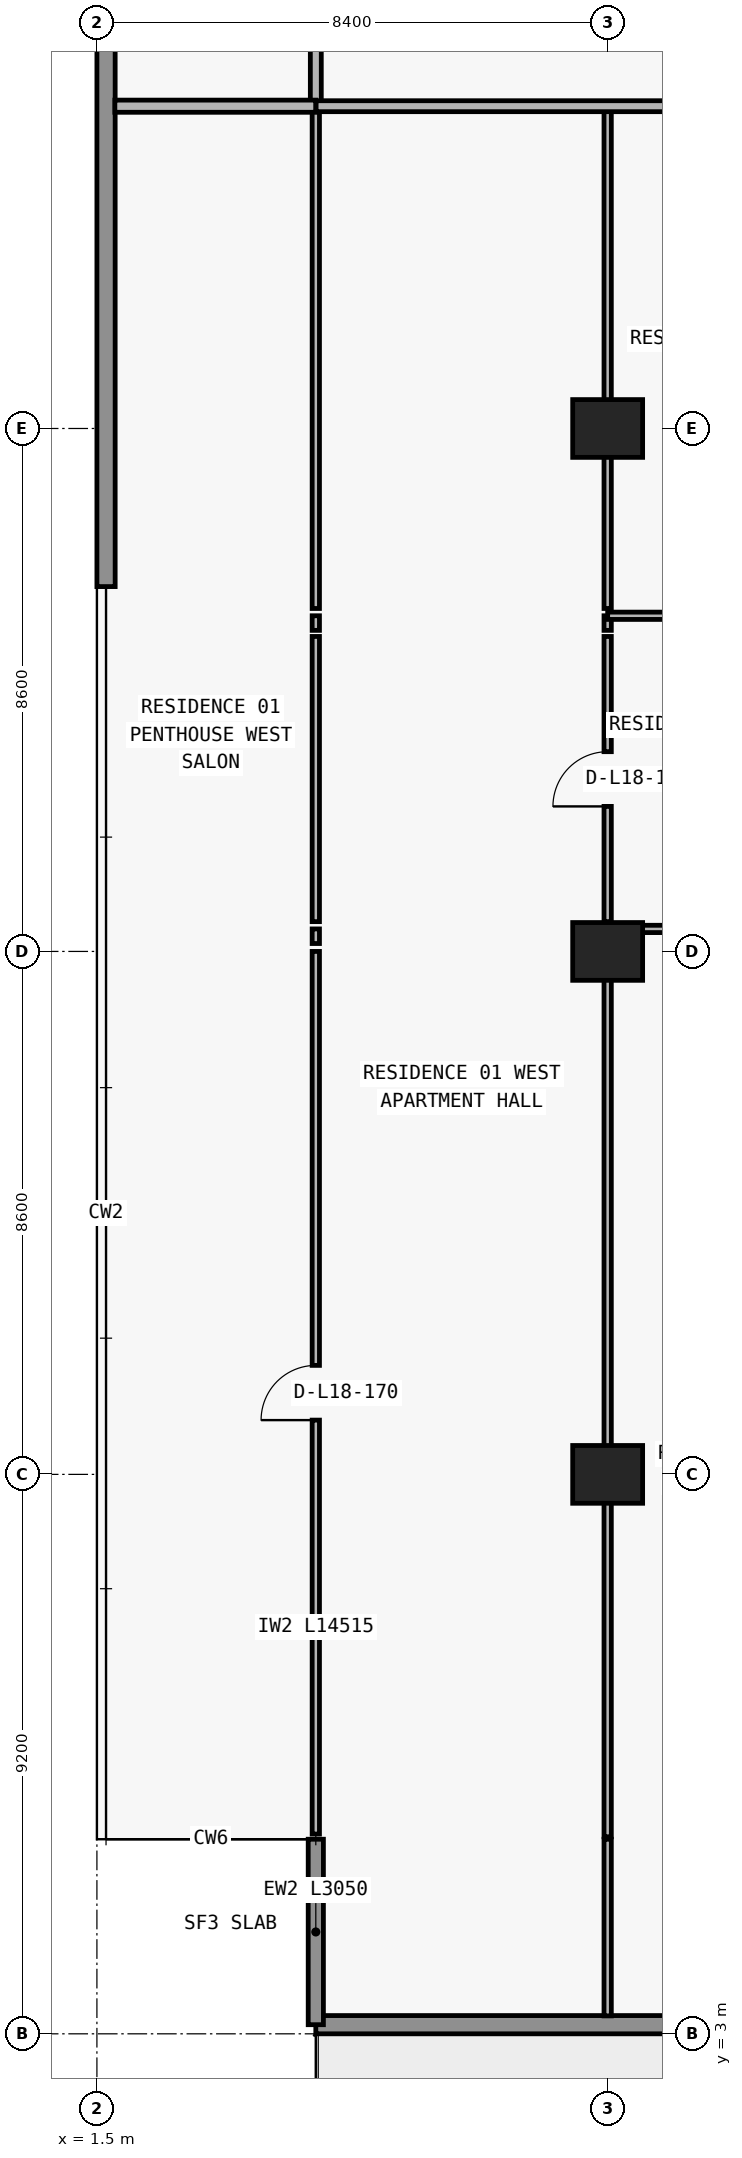
"""IFC4 building model, lengths in metres.
Left out: names, types, materials, properties, quantities, classifications, styles, units other than length and angle.
Written with IfcOpenShell. Run it as: python <this file> out.ifc"""

import sys

from ifc_helpers import new_model, si_unit, direction, frame, frame_2d, origin, origin_2d, place, context, subcontext, project, spatial, rectangle, extrude, element, fill, save


model = new_model("IFC4")
c1 = context("Model", 3, precision=1e-05, world=origin(), true_north=direction((0.0, 1.0)))
c2 = subcontext(c1, "Body", "Model", "MODEL_VIEW")
j1 = project(units=[si_unit("LENGTHUNIT", "METRE"), si_unit("PLANEANGLEUNIT", "RADIAN")], contexts=[c1])
p1 = place(None, origin())
s1 = spatial("IfcSite", under=j1, at=p1, CompositionType="ELEMENT")
p2 = place(p1, origin())
s2 = spatial("IfcBuilding", under=s1, at=p2, CompositionType="ELEMENT")
p3 = place(p2, frame((0.0, 0.0, 69.6)))
s3 = spatial("IfcBuildingStorey", under=s2, at=p3, CompositionType="ELEMENT", Elevation=69.6)
for number, where, z_axis, x_axis in (
    (1, (9.9, 12.2, 0.0), (0.0, 0.0, 1.0), (1.0, 0.0, 0.0)),
    (2, (9.9, 20.8, 0.0), (0.0, 0.0, 1.0), (1.0, 0.0, 0.0)),
    (3, (9.9, 29.4, 0.0), (0.0, 0.0, 1.0), (1.0, 0.0, 0.0)),
):
    element("IfcColumn", number, at=place(p3, frame(where, z_axis=z_axis, x_axis=x_axis)), inside=s3, PredefinedType="COLUMN", context=c2, shape_type="SweptSolid", body=[
        extrude(rectangle(XDim=1.15, YDim=0.95, at=origin_2d()), origin(), (0.0, 0.0, 1.0), 3.05),
    ])
p4 = place(p3, frame((72.7, 3.15, 0.0), z_axis=(0.0, 0.0, 1.0), x_axis=(-1.0, 0.0, 0.0)))
e4 = element("IfcWall", 4, at=p4, inside=s3, PredefinedType="STANDARD", context=c2, shape_type="SweptSolid", body=[
    extrude(rectangle(XDim=67.6, YDim=0.3, at=frame_2d((33.8, 0.0))), origin(), (0.0, 0.0, 1.0), 3.05),
])
p5 = place(p4, frame((59.826, 0.0, 0.0)))
e5 = element("IfcOpeningElement", 5, at=p5, cuts=e4, PredefinedType="OPENING", context=c2, shape_type="SweptSolid", body=[
    extrude(rectangle(XDim=2.0, YDim=2.3, at=frame_2d((1.0, 1.15))), frame((0.0, 0.16, 0.0), z_axis=(0.0, -1.0, 0.0), x_axis=(1.0, 0.0, 0.0)), (0.0, 0.0, 1.0), 0.32),
])
p6 = place(p4, frame((55.526, 0.0, 0.85)))
e6 = element("IfcOpeningElement", 6, at=p6, cuts=e4, PredefinedType="OPENING", context=c2, shape_type="SweptSolid", body=[
    extrude(rectangle(XDim=2.2, YDim=1.55, at=frame_2d((1.1, 0.775))), frame((0.0, 0.16, 0.0), z_axis=(0.0, -1.0, 0.0), x_axis=(1.0, 0.0, 0.0)), (0.0, 0.0, 1.0), 0.32),
])
p7 = place(p4, frame((51.09, 0.0, 0.0)))
e7 = element("IfcOpeningElement", 7, at=p7, cuts=e4, PredefinedType="OPENING", context=c2, shape_type="SweptSolid", body=[
    extrude(rectangle(XDim=2.0, YDim=2.3, at=frame_2d((1.0, 1.15))), frame((0.0, 0.16, 0.0), z_axis=(0.0, -1.0, 0.0), x_axis=(1.0, 0.0, 0.0)), (0.0, 0.0, 1.0), 0.32),
])
p8 = place(p4, frame((46.99, 0.0, 0.85)))
e8 = element("IfcOpeningElement", 8, at=p8, cuts=e4, PredefinedType="OPENING", context=c2, shape_type="SweptSolid", body=[
    extrude(rectangle(XDim=1.8, YDim=1.55, at=frame_2d((0.9, 0.775))), frame((0.0, 0.16, 0.0), z_axis=(0.0, -1.0, 0.0), x_axis=(1.0, 0.0, 0.0)), (0.0, 0.0, 1.0), 0.32),
])
p9 = place(p4, frame((43.026, 0.0, 0.0)))
e9 = element("IfcOpeningElement", 9, at=p9, cuts=e4, PredefinedType="OPENING", context=c2, shape_type="SweptSolid", body=[
    extrude(rectangle(XDim=2.0, YDim=2.3, at=frame_2d((1.0, 1.15))), frame((0.0, 0.16, 0.0), z_axis=(0.0, -1.0, 0.0), x_axis=(1.0, 0.0, 0.0)), (0.0, 0.0, 1.0), 0.32),
])
p10 = place(p4, frame((38.726, 0.0, 0.85)))
e10 = element("IfcOpeningElement", 10, at=p10, cuts=e4, PredefinedType="OPENING", context=c2, shape_type="SweptSolid", body=[
    extrude(rectangle(XDim=2.2, YDim=1.55, at=frame_2d((1.1, 0.775))), frame((0.0, 0.16, 0.0), z_axis=(0.0, -1.0, 0.0), x_axis=(1.0, 0.0, 0.0)), (0.0, 0.0, 1.0), 0.32),
])
p11 = place(p4, frame((34.51, 0.0, 0.0)))
e11 = element("IfcOpeningElement", 11, at=p11, cuts=e4, PredefinedType="OPENING", context=c2, shape_type="SweptSolid", body=[
    extrude(rectangle(XDim=2.0, YDim=2.3, at=frame_2d((1.0, 1.15))), frame((0.0, 0.16, 0.0), z_axis=(0.0, -1.0, 0.0), x_axis=(1.0, 0.0, 0.0)), (0.0, 0.0, 1.0), 0.32),
])
p12 = place(p4, frame((30.81, 0.0, 0.85)))
e12 = element("IfcOpeningElement", 12, at=p12, cuts=e4, PredefinedType="OPENING", context=c2, shape_type="SweptSolid", body=[
    extrude(rectangle(XDim=1.8, YDim=1.55, at=frame_2d((0.9, 0.775))), frame((0.0, 0.16, 0.0), z_axis=(0.0, -1.0, 0.0), x_axis=(1.0, 0.0, 0.0)), (0.0, 0.0, 1.0), 0.32),
])
p13 = place(p4, frame((27.026, 0.0, 0.0)))
e13 = element("IfcOpeningElement", 13, at=p13, cuts=e4, PredefinedType="OPENING", context=c2, shape_type="SweptSolid", body=[
    extrude(rectangle(XDim=2.0, YDim=2.3, at=frame_2d((1.0, 1.15))), frame((0.0, 0.16, 0.0), z_axis=(0.0, -1.0, 0.0), x_axis=(1.0, 0.0, 0.0)), (0.0, 0.0, 1.0), 0.32),
])
p14 = place(p4, frame((22.726, 0.0, 0.85)))
e14 = element("IfcOpeningElement", 14, at=p14, cuts=e4, PredefinedType="OPENING", context=c2, shape_type="SweptSolid", body=[
    extrude(rectangle(XDim=2.2, YDim=1.55, at=frame_2d((1.1, 0.775))), frame((0.0, 0.16, 0.0), z_axis=(0.0, -1.0, 0.0), x_axis=(1.0, 0.0, 0.0)), (0.0, 0.0, 1.0), 0.32),
])
p15 = place(p4, frame((18.29, 0.0, 0.0)))
e15 = element("IfcOpeningElement", 15, at=p15, cuts=e4, PredefinedType="OPENING", context=c2, shape_type="SweptSolid", body=[
    extrude(rectangle(XDim=2.0, YDim=2.3, at=frame_2d((1.0, 1.15))), frame((0.0, 0.16, 0.0), z_axis=(0.0, -1.0, 0.0), x_axis=(1.0, 0.0, 0.0)), (0.0, 0.0, 1.0), 0.32),
])
p16 = place(p4, frame((14.19, 0.0, 0.85)))
e16 = element("IfcOpeningElement", 16, at=p16, cuts=e4, PredefinedType="OPENING", context=c2, shape_type="SweptSolid", body=[
    extrude(rectangle(XDim=1.8, YDim=1.55, at=frame_2d((0.9, 0.775))), frame((0.0, 0.16, 0.0), z_axis=(0.0, -1.0, 0.0), x_axis=(1.0, 0.0, 0.0)), (0.0, 0.0, 1.0), 0.32),
])
p17 = place(p4, frame((10.226, 0.0, 0.0)))
e17 = element("IfcOpeningElement", 17, at=p17, cuts=e4, PredefinedType="OPENING", context=c2, shape_type="SweptSolid", body=[
    extrude(rectangle(XDim=2.0, YDim=2.3, at=frame_2d((1.0, 1.15))), frame((0.0, 0.16, 0.0), z_axis=(0.0, -1.0, 0.0), x_axis=(1.0, 0.0, 0.0)), (0.0, 0.0, 1.0), 0.32),
])
p18 = place(p4, frame((5.926, 0.0, 0.85)))
e18 = element("IfcOpeningElement", 18, at=p18, cuts=e4, PredefinedType="OPENING", context=c2, shape_type="SweptSolid", body=[
    extrude(rectangle(XDim=2.2, YDim=1.55, at=frame_2d((1.1, 0.775))), frame((0.0, 0.16, 0.0), z_axis=(0.0, -1.0, 0.0), x_axis=(1.0, 0.0, 0.0)), (0.0, 0.0, 1.0), 0.32),
])
p19 = place(p3, frame((5.1, 6.2, 0.0), z_axis=(0.0, 0.0, 1.0), x_axis=(0.0, -1.0, 0.0)))
e19 = element("IfcWall", 19, at=p19, inside=s3, PredefinedType="ELEMENTEDWALL", context=c2, shape_type="SweptSolid", body=[
    extrude(rectangle(XDim=3.05, YDim=0.25, at=frame_2d((1.525, 0.0))), origin(), (0.0, 0.0, 1.0), 3.05),
])
p20 = place(p3, frame((1.65, 26.8, 0.0), z_axis=(0.0, 0.0, 1.0), x_axis=(0.0, 1.0, 0.0)))
e20 = element("IfcWall", 20, at=p20, inside=s3, PredefinedType="STANDARD", context=c2, shape_type="SweptSolid", body=[
    extrude(rectangle(XDim=20.6, YDim=0.3, at=frame_2d((10.3, 0.0))), origin(), (0.0, 0.0, 1.0), 3.05),
])
p21 = place(p3, frame((5.1, 6.285, 0.0), z_axis=(0.0, 0.0, 1.0), x_axis=(0.0, 1.0, 0.0)))
e21 = element("IfcWall", 21, at=p21, inside=s3, PredefinedType="PARTITIONING", context=c2, shape_type="SweptSolid", body=[
    extrude(rectangle(XDim=14.515, YDim=0.12, at=frame_2d((7.258, 0.0))), origin(), (0.0, 0.0, 1.0), 3.05),
])
p22 = place(p21, frame((6.808, 0.0, 0.0)))
e22 = element("IfcOpeningElement", 22, at=p22, cuts=e21, PredefinedType="OPENING", context=c2, shape_type="SweptSolid", body=[
    extrude(rectangle(XDim=0.9, YDim=2.15, at=frame_2d((0.45, 1.075))), frame((0.0, 0.07, 0.0), z_axis=(0.0, -1.0, 0.0), x_axis=(1.0, 0.0, 0.0)), (0.0, 0.0, 1.0), 0.14),
])
p23 = place(p3, frame((5.1, 20.93, 0.0), z_axis=(0.0, 0.0, 1.0), x_axis=(0.0, 1.0, 0.0)))
e23 = element("IfcWall", 23, at=p23, inside=s3, PredefinedType="PARTITIONING", context=c2, shape_type="SweptSolid", body=[
    extrude(rectangle(XDim=0.24, YDim=0.12, at=frame_2d((0.12, 0.0))), origin(), (0.0, 0.0, 1.0), 3.05),
])
p24 = place(p3, frame((5.1, 21.29, 0.0), z_axis=(0.0, 0.0, 1.0), x_axis=(0.0, 1.0, 0.0)))
e24 = element("IfcWall", 24, at=p24, inside=s3, PredefinedType="PARTITIONING", context=c2, shape_type="SweptSolid", body=[
    extrude(rectangle(XDim=4.69, YDim=0.12, at=frame_2d((2.345, 0.0))), origin(), (0.0, 0.0, 1.0), 3.05),
])
p25 = place(p3, frame((5.1, 26.08, 0.0), z_axis=(0.0, 0.0, 1.0), x_axis=(0.0, 1.0, 0.0)))
e25 = element("IfcWall", 25, at=p25, inside=s3, PredefinedType="PARTITIONING", context=c2, shape_type="SweptSolid", body=[
    extrude(rectangle(XDim=0.24, YDim=0.12, at=frame_2d((0.12, 0.0))), origin(), (0.0, 0.0, 1.0), 3.05),
])
p26 = place(p3, frame((5.1, 26.44, 0.0), z_axis=(0.0, 0.0, 1.0), x_axis=(0.0, 1.0, 0.0)))
e26 = element("IfcWall", 26, at=p26, inside=s3, PredefinedType="PARTITIONING", context=c2, shape_type="SweptSolid", body=[
    extrude(rectangle(XDim=8.26, YDim=0.12, at=frame_2d((4.13, 0.0))), origin(), (0.0, 0.0, 1.0), 3.05),
])
p27 = place(p3, frame((5.1, 34.705, 0.0), z_axis=(0.0, 0.0, 1.0), x_axis=(0.0, 1.0, 0.0)))
e27 = element("IfcWall", 27, at=p27, inside=s3, PredefinedType="PARTITIONING", context=c2, shape_type="SweptSolid", body=[
    extrude(rectangle(XDim=2.195, YDim=0.18, at=frame_2d((1.097, 0.0))), origin(), (0.0, 0.0, 1.0), 3.05),
])
p28 = place(p3, frame((9.9, 3.295, 0.0), z_axis=(0.0, 0.0, 1.0), x_axis=(0.0, 1.0, 0.0)))
e28 = element("IfcWall", 28, at=p28, inside=s3, PredefinedType="PARTITIONING", context=c2, shape_type="SweptSolid", body=[
    extrude(rectangle(XDim=2.905, YDim=0.12, at=frame_2d((1.453, 0.0))), origin(), (0.0, 0.0, 1.0), 3.05),
])
p29 = place(p3, frame((9.9, 6.24, 0.0), z_axis=(0.0, 0.0, 1.0), x_axis=(0.0, 1.0, 0.0)))
e29 = element("IfcWall", 29, at=p29, inside=s3, PredefinedType="PARTITIONING", context=c2, shape_type="SweptSolid", body=[
    extrude(rectangle(XDim=14.56, YDim=0.12, at=frame_2d((7.28, 0.0))), origin(), (0.0, 0.0, 1.0), 2.11),
])
p30 = place(p3, frame((9.9, 20.93, 0.0), z_axis=(0.0, 0.0, 1.0), x_axis=(0.0, 1.0, 0.0)))
e30 = element("IfcWall", 30, at=p30, inside=s3, PredefinedType="PARTITIONING", context=c2, shape_type="SweptSolid", body=[
    extrude(rectangle(XDim=0.24, YDim=0.12, at=frame_2d((0.12, 0.0))), origin(), (0.0, 0.0, 1.0), 3.05),
])
p31 = place(p3, frame((9.9, 21.29, 0.0), z_axis=(0.0, 0.0, 1.0), x_axis=(0.0, 1.0, 0.0)))
e31 = element("IfcWall", 31, at=p31, inside=s3, PredefinedType="PARTITIONING", context=c2, shape_type="SweptSolid", body=[
    extrude(rectangle(XDim=4.69, YDim=0.12, at=frame_2d((2.345, 0.0))), origin(), (0.0, 0.0, 1.0), 2.11),
])
p32 = place(p31, frame((1.895, 0.0, 0.0)))
e32 = element("IfcOpeningElement", 32, at=p32, cuts=e31, PredefinedType="OPENING", context=c2, shape_type="SweptSolid", body=[
    extrude(rectangle(XDim=0.9, YDim=2.06, at=frame_2d((0.45, 1.03))), frame((0.0, 0.07, 0.0), z_axis=(0.0, -1.0, 0.0), x_axis=(1.0, 0.0, 0.0)), (0.0, 0.0, 1.0), 0.14),
])
p33 = place(p3, frame((9.9, 26.08, 0.0), z_axis=(0.0, 0.0, 1.0), x_axis=(0.0, 1.0, 0.0)))
e33 = element("IfcWall", 33, at=p33, inside=s3, PredefinedType="PARTITIONING", context=c2, shape_type="SweptSolid", body=[
    extrude(rectangle(XDim=0.24, YDim=0.12, at=frame_2d((0.12, 0.0))), origin(), (0.0, 0.0, 1.0), 2.11),
])
p34 = place(p3, frame((9.9, 26.44, 0.0), z_axis=(0.0, 0.0, 1.0), x_axis=(0.0, 1.0, 0.0)))
e34 = element("IfcWall", 34, at=p34, inside=s3, PredefinedType="PARTITIONING", context=c2, shape_type="SweptSolid", body=[
    extrude(rectangle(XDim=8.26, YDim=0.12, at=frame_2d((4.13, 0.0))), origin(), (0.0, 0.0, 1.0), 2.11),
])
p35 = place(p3, frame((9.9, 21.17, 0.0), z_axis=(0.0, 0.0, 1.0), x_axis=(1.0, 0.0, 0.0)))
e35 = element("IfcWall", 35, at=p35, inside=s3, PredefinedType="PARTITIONING", context=c2, shape_type="SweptSolid", body=[
    extrude(rectangle(XDim=8.4, YDim=0.12, at=frame_2d((4.2, 0.0))), origin(), (0.0, 0.0, 1.0), 3.05),
])
p36 = place(p35, frame((1.524, 0.0, 0.0)))
e36 = element("IfcOpeningElement", 36, at=p36, cuts=e35, PredefinedType="OPENING", context=c2, shape_type="SweptSolid", body=[
    extrude(rectangle(XDim=0.9, YDim=2.15, at=frame_2d((0.45, 1.075))), frame((0.0, 0.07, 0.0), z_axis=(0.0, -1.0, 0.0), x_axis=(1.0, 0.0, 0.0)), (0.0, 0.0, 1.0), 0.14),
])
p37 = place(p35, frame((6.143, 0.0, 0.0)))
e37 = element("IfcOpeningElement", 37, at=p37, cuts=e35, PredefinedType="OPENING", context=c2, shape_type="SweptSolid", body=[
    extrude(rectangle(XDim=0.9, YDim=2.15, at=frame_2d((0.45, 1.075))), frame((0.0, 0.07, 0.0), z_axis=(0.0, -1.0, 0.0), x_axis=(1.0, 0.0, 0.0)), (0.0, 0.0, 1.0), 0.14),
])
p38 = place(p3, frame((9.9, 26.32, 0.0), z_axis=(0.0, 0.0, 1.0), x_axis=(1.0, 0.0, 0.0)))
e38 = element("IfcWall", 38, at=p38, inside=s3, PredefinedType="PARTITIONING", context=c2, shape_type="SweptSolid", body=[
    extrude(rectangle(XDim=8.4, YDim=0.12, at=frame_2d((4.2, 0.0))), origin(), (0.0, 0.0, 1.0), 3.05),
])
p39 = place(p38, frame((1.943, 0.0, 0.0)))
e39 = element("IfcOpeningElement", 39, at=p39, cuts=e38, PredefinedType="OPENING", context=c2, shape_type="SweptSolid", body=[
    extrude(rectangle(XDim=0.9, YDim=2.15, at=frame_2d((0.45, 1.075))), frame((0.0, 0.07, 0.0), z_axis=(0.0, -1.0, 0.0), x_axis=(1.0, 0.0, 0.0)), (0.0, 0.0, 1.0), 0.14),
])
p40 = place(p3, frame((1.795, 34.7, 0.0), z_axis=(0.0, 0.0, 1.0), x_axis=(1.0, 0.0, 0.0)))
e40 = element("IfcWall", 40, at=p40, inside=s3, PredefinedType="PARTITIONING", context=c2, shape_type="SweptSolid", body=[
    extrude(rectangle(XDim=3.305, YDim=0.2, at=frame_2d((1.653, 0.0))), origin(), (0.0, 0.0, 1.0), 3.05),
])
p41 = place(p3, frame((5.105, 34.7, 0.0), z_axis=(0.0, 0.0, 1.0), x_axis=(1.0, 0.0, 0.0)))
e41 = element("IfcWall", 41, at=p41, inside=s3, PredefinedType="PARTITIONING", context=c2, shape_type="SweptSolid", body=[
    extrude(rectangle(XDim=67.595, YDim=0.18, at=frame_2d((33.797, 0.0))), origin(), (0.0, 0.0, 1.0), 3.05),
])
p42 = place(p41, frame((7.67, 0.0, 0.0)))
e42 = element("IfcOpeningElement", 42, at=p42, cuts=e41, PredefinedType="OPENING", context=c2, shape_type="SweptSolid", body=[
    extrude(rectangle(XDim=1.0, YDim=2.2, at=frame_2d((0.5, 1.1))), frame((0.0, 0.1, 0.0), z_axis=(0.0, -1.0, 0.0), x_axis=(1.0, 0.0, 0.0)), (0.0, 0.0, 1.0), 0.2),
])
p43 = place(p41, frame((16.07, 0.0, 0.0)))
e43 = element("IfcOpeningElement", 43, at=p43, cuts=e41, PredefinedType="OPENING", context=c2, shape_type="SweptSolid", body=[
    extrude(rectangle(XDim=1.0, YDim=2.2, at=frame_2d((0.5, 1.1))), frame((0.0, 0.1, 0.0), z_axis=(0.0, -1.0, 0.0), x_axis=(1.0, 0.0, 0.0)), (0.0, 0.0, 1.0), 0.2),
])
p44 = place(p41, frame((24.47, 0.0, 0.0)))
e44 = element("IfcOpeningElement", 44, at=p44, cuts=e41, PredefinedType="OPENING", context=c2, shape_type="SweptSolid", body=[
    extrude(rectangle(XDim=1.0, YDim=2.2, at=frame_2d((0.5, 1.1))), frame((0.0, 0.1, 0.0), z_axis=(0.0, -1.0, 0.0), x_axis=(1.0, 0.0, 0.0)), (0.0, 0.0, 1.0), 0.2),
])
p45 = place(p41, frame((32.47, 0.0, 0.0)))
e45 = element("IfcOpeningElement", 45, at=p45, cuts=e41, PredefinedType="OPENING", context=c2, shape_type="SweptSolid", body=[
    extrude(rectangle(XDim=1.0, YDim=2.2, at=frame_2d((0.5, 1.1))), frame((0.0, 0.1, 0.0), z_axis=(0.0, -1.0, 0.0), x_axis=(1.0, 0.0, 0.0)), (0.0, 0.0, 1.0), 0.2),
])
p46 = place(p41, frame((40.47, 0.0, 0.0)))
e46 = element("IfcOpeningElement", 46, at=p46, cuts=e41, PredefinedType="OPENING", context=c2, shape_type="SweptSolid", body=[
    extrude(rectangle(XDim=1.0, YDim=2.2, at=frame_2d((0.5, 1.1))), frame((0.0, 0.1, 0.0), z_axis=(0.0, -1.0, 0.0), x_axis=(1.0, 0.0, 0.0)), (0.0, 0.0, 1.0), 0.2),
])
p47 = place(p41, frame((48.87, 0.0, 0.0)))
e47 = element("IfcOpeningElement", 47, at=p47, cuts=e41, PredefinedType="OPENING", context=c2, shape_type="SweptSolid", body=[
    extrude(rectangle(XDim=1.0, YDim=2.2, at=frame_2d((0.5, 1.1))), frame((0.0, 0.1, 0.0), z_axis=(0.0, -1.0, 0.0), x_axis=(1.0, 0.0, 0.0)), (0.0, 0.0, 1.0), 0.2),
])
p48 = place(p41, frame((57.27, 0.0, 0.0)))
e48 = element("IfcOpeningElement", 48, at=p48, cuts=e41, PredefinedType="OPENING", context=c2, shape_type="SweptSolid", body=[
    extrude(rectangle(XDim=1.0, YDim=2.2, at=frame_2d((0.5, 1.1))), frame((0.0, 0.1, 0.0), z_axis=(0.0, -1.0, 0.0), x_axis=(1.0, 0.0, 0.0)), (0.0, 0.0, 1.0), 0.2),
])
p49 = place(p32, origin())
e49 = element("IfcDoor", 49, at=p49, inside=s3, OperationType="SINGLE_SWING_LEFT", PredefinedType="DOOR", context=c2, shape_type="SweptSolid", body=[
    extrude(rectangle(XDim=0.9, YDim=2.06, at=frame_2d((0.45, 1.03))), frame((0.0, 0.025, 0.0), z_axis=(0.0, -1.0, 0.0), x_axis=(1.0, 0.0, 0.0)), (0.0, 0.0, 1.0), 0.05),
])
fill(e32, e49)
p50 = place(p22, origin())
e50 = element("IfcDoor", 50, at=p50, inside=s3, OperationType="SINGLE_SWING_LEFT", PredefinedType="DOOR", context=c2, shape_type="SweptSolid", body=[
    extrude(rectangle(XDim=0.9, YDim=2.15, at=frame_2d((0.45, 1.075))), frame((0.0, 0.025, 0.0), z_axis=(0.0, -1.0, 0.0), x_axis=(1.0, 0.0, 0.0)), (0.0, 0.0, 1.0), 0.05),
])
fill(e22, e50)
save(model, sys.argv[1])
